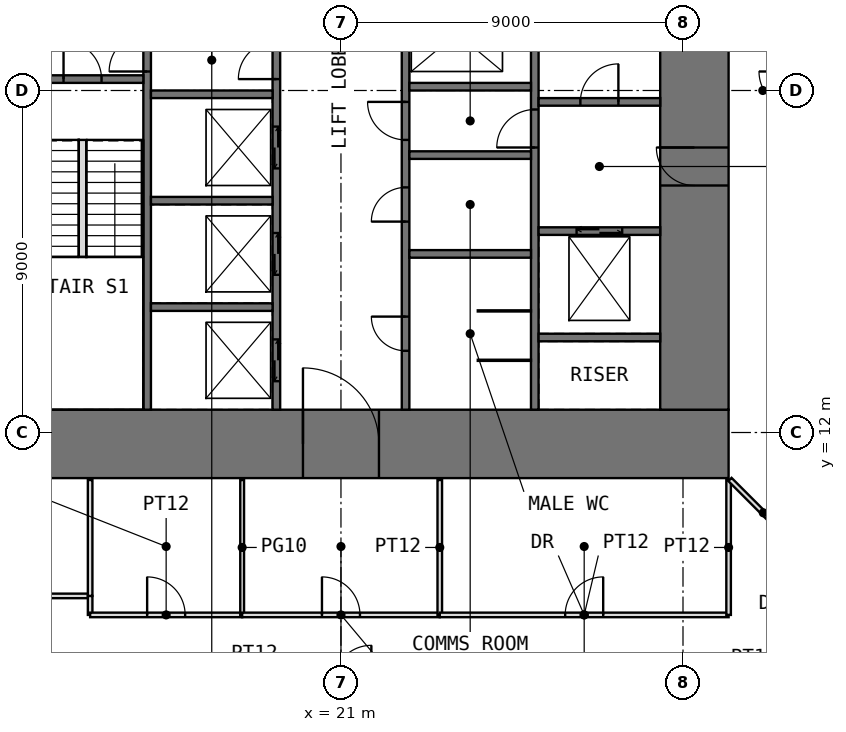
"""IFC4 building model, lengths in metres.
Left out: names, types, materials, properties, quantities, classifications, styles, units other than length and angle.
Written with IfcOpenShell. Run it as: python <this file> out.ifc"""

import sys

from ifc_helpers import new_model, si_unit, direction, frame, frame_2d, origin, place, context, subcontext, project, spatial, rectangle, extrude, element, fill, save


model = new_model("IFC4")
c1 = context("Model", 3, precision=1e-05, world=origin(), true_north=direction((0.0, 1.0)))
c2 = subcontext(c1, "Body", "Model", "MODEL_VIEW")
j1 = project(units=[si_unit("LENGTHUNIT", "METRE"), si_unit("PLANEANGLEUNIT", "RADIAN")], contexts=[c1])
p1 = place(None, origin())
s1 = spatial("IfcSite", under=j1, at=p1, CompositionType="ELEMENT")
p2 = place(p1, origin())
s2 = spatial("IfcBuilding", under=s1, at=p2, CompositionType="ELEMENT")
p3 = place(p2, frame((0.0, 0.0, 30.5)))
s3 = spatial("IfcBuildingStorey", under=s2, at=p3, CompositionType="ELEMENT", Elevation=30.5)
p4 = place(p3, frame((10.8, 11.7, -0.05), z_axis=(0.0, 0.0, 1.0), x_axis=(1.0, 0.0, 0.0)))
e1 = element("IfcWall", 1, at=p4, inside=s3, PredefinedType="SHEAR", context=c2, shape_type="SweptSolid", body=[
    extrude(rectangle(XDim=20.4, YDim=1.8, at=frame_2d((10.2, 0.0))), origin(), (0.0, 0.0, 1.0), 4.0),
])
p5 = place(p4, frame((9.2, 0.0, 0.05)))
e2 = element("IfcOpeningElement", 2, at=p5, cuts=e1, PredefinedType="OPENING", context=c2, shape_type="SweptSolid", body=[
    extrude(rectangle(XDim=2.0, YDim=2.2, at=frame_2d((1.0, 1.1))), frame((0.0, 0.91, 0.0), z_axis=(0.0, -1.0, 0.0), x_axis=(1.0, 0.0, 0.0)), (0.0, 0.0, 1.0), 1.82),
])
p6 = place(p3, frame((30.3, 12.6, -0.05), z_axis=(0.0, 0.0, 1.0), x_axis=(0.0, 1.0, 0.0)))
e3 = element("IfcWall", 3, at=p6, inside=s3, PredefinedType="SHEAR", context=c2, shape_type="SweptSolid", body=[
    extrude(rectangle(XDim=16.8, YDim=1.8, at=frame_2d((8.4, 0.0))), origin(), (0.0, 0.0, 1.0), 4.0),
])
p7 = place(p6, frame((5.9, 0.0, 0.05)))
e4 = element("IfcOpeningElement", 4, at=p7, cuts=e3, PredefinedType="OPENING", context=c2, shape_type="SweptSolid", body=[
    extrude(rectangle(XDim=1.0, YDim=2.2, at=frame_2d((0.5, 1.1))), frame((0.0, 0.91, 0.0), z_axis=(0.0, -1.0, 0.0), x_axis=(1.0, 0.0, 0.0)), (0.0, 0.0, 1.0), 1.82),
])
p8 = place(p3, frame((15.9, 12.6, -0.05), z_axis=(0.0, 0.0, 1.0), x_axis=(0.0, 1.0, 0.0)))
e5 = element("IfcWall", 5, at=p8, inside=s3, PredefinedType="SHEAR", context=c2, shape_type="SweptSolid", body=[
    extrude(rectangle(XDim=16.8, YDim=0.2, at=frame_2d((8.4, 0.0))), origin(), (0.0, 0.0, 1.0), 4.0),
])
p9 = place(p8, frame((8.9, 0.0, 0.05)))
e6 = element("IfcOpeningElement", 6, at=p9, cuts=e5, PredefinedType="OPENING", context=c2, shape_type="SweptSolid", body=[
    extrude(rectangle(XDim=1.0, YDim=2.2, at=frame_2d((0.5, 1.1))), frame((0.0, 0.11, 0.0), z_axis=(0.0, -1.0, 0.0), x_axis=(1.0, 0.0, 0.0)), (0.0, 0.0, 1.0), 0.22),
])
p10 = place(p3, frame((19.3, 12.6, -0.05), z_axis=(0.0, 0.0, 1.0), x_axis=(0.0, 1.0, 0.0)))
e7 = element("IfcWall", 7, at=p10, inside=s3, PredefinedType="SHEAR", context=c2, shape_type="SweptSolid", body=[
    extrude(rectangle(XDim=16.8, YDim=0.2, at=frame_2d((8.4, 0.0))), origin(), (0.0, 0.0, 1.0), 4.0),
])
p11 = place(p10, frame((8.7, 0.0, 0.05)))
e8 = element("IfcOpeningElement", 8, at=p11, cuts=e7, PredefinedType="OPENING", context=c2, shape_type="SweptSolid", body=[
    extrude(rectangle(XDim=1.0, YDim=2.2, at=frame_2d((0.5, 1.1))), frame((0.0, 0.11, 0.0), z_axis=(0.0, -1.0, 0.0), x_axis=(1.0, 0.0, 0.0)), (0.0, 0.0, 1.0), 0.22),
])
p12 = place(p10, frame((10.85, 0.0, 0.05)))
e9 = element("IfcOpeningElement", 9, at=p12, cuts=e7, PredefinedType="OPENING", context=c2, shape_type="SweptSolid", body=[
    extrude(rectangle(XDim=0.9, YDim=2.2, at=frame_2d((0.45, 1.1))), frame((0.0, 0.11, 0.0), z_axis=(0.0, -1.0, 0.0), x_axis=(1.0, 0.0, 0.0)), (0.0, 0.0, 1.0), 0.22),
])
p13 = place(p10, frame((13.3, 0.0, 0.05)))
e10 = element("IfcOpeningElement", 10, at=p13, cuts=e7, PredefinedType="OPENING", context=c2, shape_type="SweptSolid", body=[
    extrude(rectangle(XDim=1.0, YDim=2.2, at=frame_2d((0.5, 1.1))), frame((0.0, 0.11, 0.0), z_axis=(0.0, -1.0, 0.0), x_axis=(1.0, 0.0, 0.0)), (0.0, 0.0, 1.0), 0.22),
])
p14 = place(p10, frame((15.55, 0.0, 0.05)))
e11 = element("IfcOpeningElement", 11, at=p14, cuts=e7, PredefinedType="OPENING", context=c2, shape_type="SweptSolid", body=[
    extrude(rectangle(XDim=0.9, YDim=2.2, at=frame_2d((0.45, 1.1))), frame((0.0, 0.11, 0.0), z_axis=(0.0, -1.0, 0.0), x_axis=(1.0, 0.0, 0.0)), (0.0, 0.0, 1.0), 0.22),
])
p15 = place(p10, frame((0.75, 0.0, 0.05)))
e12 = element("IfcOpeningElement", 12, at=p15, cuts=e7, PredefinedType="OPENING", context=c2, shape_type="SweptSolid", body=[
    extrude(rectangle(XDim=1.1, YDim=2.2, at=frame_2d((0.55, 1.1))), frame((0.0, 0.11, 0.0), z_axis=(0.0, -1.0, 0.0), x_axis=(1.0, 0.0, 0.0)), (0.0, 0.0, 1.0), 0.22),
])
p16 = place(p10, frame((3.55, 0.0, 0.05)))
e13 = element("IfcOpeningElement", 13, at=p16, cuts=e7, PredefinedType="OPENING", context=c2, shape_type="SweptSolid", body=[
    extrude(rectangle(XDim=1.1, YDim=2.2, at=frame_2d((0.55, 1.1))), frame((0.0, 0.11, 0.0), z_axis=(0.0, -1.0, 0.0), x_axis=(1.0, 0.0, 0.0)), (0.0, 0.0, 1.0), 0.22),
])
p17 = place(p10, frame((6.35, 0.0, 0.05)))
e14 = element("IfcOpeningElement", 14, at=p17, cuts=e7, PredefinedType="OPENING", context=c2, shape_type="SweptSolid", body=[
    extrude(rectangle(XDim=1.1, YDim=2.2, at=frame_2d((0.55, 1.1))), frame((0.0, 0.11, 0.0), z_axis=(0.0, -1.0, 0.0), x_axis=(1.0, 0.0, 0.0)), (0.0, 0.0, 1.0), 0.22),
])
p18 = place(p3, frame((22.7, 12.6, -0.05), z_axis=(0.0, 0.0, 1.0), x_axis=(0.0, 1.0, 0.0)))
e15 = element("IfcWall", 15, at=p18, inside=s3, PredefinedType="SHEAR", context=c2, shape_type="SweptSolid", body=[
    extrude(rectangle(XDim=16.8, YDim=0.2, at=frame_2d((8.4, 0.0))), origin(), (0.0, 0.0, 1.0), 4.0),
])
p19 = place(p18, frame((7.1, 0.0, 0.05)))
e16 = element("IfcOpeningElement", 16, at=p19, cuts=e15, PredefinedType="OPENING", context=c2, shape_type="SweptSolid", body=[
    extrude(rectangle(XDim=1.0, YDim=2.2, at=frame_2d((0.5, 1.1))), frame((0.0, 0.11, 0.0), z_axis=(0.0, -1.0, 0.0), x_axis=(1.0, 0.0, 0.0)), (0.0, 0.0, 1.0), 0.22),
])
p20 = place(p18, frame((1.55, 0.0, 0.05)))
e17 = element("IfcOpeningElement", 17, at=p20, cuts=e15, PredefinedType="OPENING", context=c2, shape_type="SweptSolid", body=[
    extrude(rectangle(XDim=0.9, YDim=2.2, at=frame_2d((0.45, 1.1))), frame((0.0, 0.11, 0.0), z_axis=(0.0, -1.0, 0.0), x_axis=(1.0, 0.0, 0.0)), (0.0, 0.0, 1.0), 0.22),
])
p21 = place(p18, frame((4.95, 0.0, 0.05)))
e18 = element("IfcOpeningElement", 18, at=p21, cuts=e15, PredefinedType="OPENING", context=c2, shape_type="SweptSolid", body=[
    extrude(rectangle(XDim=0.9, YDim=2.2, at=frame_2d((0.45, 1.1))), frame((0.0, 0.11, 0.0), z_axis=(0.0, -1.0, 0.0), x_axis=(1.0, 0.0, 0.0)), (0.0, 0.0, 1.0), 0.22),
])
p22 = place(p3, frame((26.1, 12.6, -0.05), z_axis=(0.0, 0.0, 1.0), x_axis=(0.0, 1.0, 0.0)))
e19 = element("IfcWall", 19, at=p22, inside=s3, PredefinedType="SHEAR", context=c2, shape_type="SweptSolid", body=[
    extrude(rectangle(XDim=16.8, YDim=0.2, at=frame_2d((8.4, 0.0))), origin(), (0.0, 0.0, 1.0), 4.0),
])
p23 = place(p22, frame((6.9, 0.0, 0.05)))
e20 = element("IfcOpeningElement", 20, at=p23, cuts=e19, PredefinedType="OPENING", context=c2, shape_type="SweptSolid", body=[
    extrude(rectangle(XDim=1.0, YDim=2.2, at=frame_2d((0.5, 1.1))), frame((0.0, 0.11, 0.0), z_axis=(0.0, -1.0, 0.0), x_axis=(1.0, 0.0, 0.0)), (0.0, 0.0, 1.0), 0.22),
])
p24 = place(p3, frame((12.6, 21.3, -0.05), z_axis=(0.0, 0.0, 1.0), x_axis=(1.0, 0.0, 0.0)))
e21 = element("IfcWall", 21, at=p24, inside=s3, PredefinedType="SHEAR", context=c2, shape_type="SweptSolid", body=[
    extrude(rectangle(XDim=3.2, YDim=0.2, at=frame_2d((1.6, 0.0))), origin(), (0.0, 0.0, 1.0), 4.0),
])
p25 = place(p24, frame((1.1, 0.0, 0.05)))
e22 = element("IfcOpeningElement", 22, at=p25, cuts=e21, PredefinedType="OPENING", context=c2, shape_type="SweptSolid", body=[
    extrude(rectangle(XDim=1.0, YDim=2.2, at=frame_2d((0.5, 1.1))), frame((0.0, 0.11, 0.0), z_axis=(0.0, -1.0, 0.0), x_axis=(1.0, 0.0, 0.0)), (0.0, 0.0, 1.0), 0.22),
])
for number, where, z_axis, x_axis in (
    (23, (16.0, 15.3, -0.05), (0.0, 0.0, 1.0), (1.0, 0.0, 0.0)),
    (24, (16.0, 18.1, -0.05), (0.0, 0.0, 1.0), (1.0, 0.0, 0.0)),
    (25, (16.0, 20.9, -0.05), (0.0, 0.0, 1.0), (1.0, 0.0, 0.0)),
    (26, (22.8, 16.7, -0.05), (0.0, 0.0, 1.0), (1.0, 0.0, 0.0)),
    (27, (22.8, 19.3, -0.05), (0.0, 0.0, 1.0), (1.0, 0.0, 0.0)),
    (28, (22.8, 21.1, -0.05), (0.0, 0.0, 1.0), (1.0, 0.0, 0.0)),
    (29, (26.2, 14.5, -0.05), (0.0, 0.0, 1.0), (1.0, 0.0, 0.0)),
):
    element("IfcWall", number, at=place(p3, frame(where, z_axis=z_axis, x_axis=x_axis)), inside=s3, PredefinedType="SHEAR", context=c2, shape_type="SweptSolid", body=[
        extrude(rectangle(XDim=3.2, YDim=0.2, at=frame_2d((1.6, 0.0))), origin(), (0.0, 0.0, 1.0), 4.0),
    ])
p26 = place(p3, frame((26.2, 17.3, -0.05), z_axis=(0.0, 0.0, 1.0), x_axis=(1.0, 0.0, 0.0)))
e30 = element("IfcWall", 30, at=p26, inside=s3, PredefinedType="SHEAR", context=c2, shape_type="SweptSolid", body=[
    extrude(rectangle(XDim=3.2, YDim=0.2, at=frame_2d((1.6, 0.0))), origin(), (0.0, 0.0, 1.0), 4.0),
])
p27 = place(p26, frame((1.0, 0.0, 0.05)))
e31 = element("IfcOpeningElement", 31, at=p27, cuts=e30, PredefinedType="OPENING", context=c2, shape_type="SweptSolid", body=[
    extrude(rectangle(XDim=1.2, YDim=2.2, at=frame_2d((0.6, 1.1))), frame((0.0, 0.11, 0.0), z_axis=(0.0, -1.0, 0.0), x_axis=(1.0, 0.0, 0.0)), (0.0, 0.0, 1.0), 0.22),
])
p28 = place(p3, frame((26.2, 20.7, -0.05), z_axis=(0.0, 0.0, 1.0), x_axis=(1.0, 0.0, 0.0)))
e32 = element("IfcWall", 32, at=p28, inside=s3, PredefinedType="SHEAR", context=c2, shape_type="SweptSolid", body=[
    extrude(rectangle(XDim=3.2, YDim=0.2, at=frame_2d((1.6, 0.0))), origin(), (0.0, 0.0, 1.0), 4.0),
])
p29 = place(p28, frame((1.1, 0.0, 0.05)))
e33 = element("IfcOpeningElement", 33, at=p29, cuts=e32, PredefinedType="OPENING", context=c2, shape_type="SweptSolid", body=[
    extrude(rectangle(XDim=1.0, YDim=2.2, at=frame_2d((0.5, 1.1))), frame((0.0, 0.11, 0.0), z_axis=(0.0, -1.0, 0.0), x_axis=(1.0, 0.0, 0.0)), (0.0, 0.0, 1.0), 0.22),
])
for number, where, z_axis, x_axis in (
    (34, (24.6, 13.9, 0.0), (0.0, 0.0, 1.0), (1.0, 0.0, 0.0)),
    (35, (24.6, 15.2, 0.0), (0.0, 0.0, 1.0), (1.0, 0.0, 0.0)),
):
    element("IfcWall", number, at=place(p3, frame(where, z_axis=z_axis, x_axis=x_axis)), inside=s3, PredefinedType="PARTITIONING", context=c2, shape_type="SweptSolid", body=[
        extrude(rectangle(XDim=1.4, YDim=0.03, at=frame_2d((0.7, 0.0))), origin(), (0.0, 0.0, 1.0), 3.75),
    ])
p30 = place(p3, frame((10.8, 7.7, 0.0), z_axis=(0.0, 0.0, 1.0), x_axis=(1.0, 0.0, 0.0)))
e36 = element("IfcWall", 36, at=p30, inside=s3, PredefinedType="PARTITIONING", context=c2, shape_type="SweptSolid", body=[
    extrude(rectangle(XDim=3.6, YDim=0.12, at=frame_2d((1.8, 0.0))), origin(), (0.0, 0.0, 1.0), 3.75),
])
p31 = place(p30, frame((1.3, 0.0, 0.0)))
e37 = element("IfcOpeningElement", 37, at=p31, cuts=e36, PredefinedType="OPENING", context=c2, shape_type="SweptSolid", body=[
    extrude(rectangle(XDim=1.0, YDim=2.2, at=frame_2d((0.5, 1.1))), frame((0.0, 0.07, 0.0), z_axis=(0.0, -1.0, 0.0), x_axis=(1.0, 0.0, 0.0)), (0.0, 0.0, 1.0), 0.14),
])
p32 = place(p3, frame((14.4, 7.2, 0.0), z_axis=(0.0, 0.0, 1.0), x_axis=(0.0, 1.0, 0.0)))
e38 = element("IfcWall", 38, at=p32, inside=s3, PredefinedType="PARTITIONING", context=c2, shape_type="SweptSolid", body=[
    extrude(rectangle(XDim=0.5, YDim=0.12, at=frame_2d((0.25, 0.0))), origin(), (0.0, 0.0, 1.0), 3.75),
])
p33 = place(p3, frame((14.4, 7.2, 0.0), z_axis=(0.0, 0.0, 1.0), x_axis=(1.0, 0.0, 0.0)))
e39 = element("IfcWall", 39, at=p33, inside=s3, PredefinedType="PARTITIONING", context=c2, shape_type="SweptSolid", body=[
    extrude(rectangle(XDim=4.0, YDim=0.12, at=frame_2d((2.0, 0.0))), origin(), (0.0, 0.0, 1.0), 3.75),
])
p34 = place(p33, frame((1.5, 0.0, 0.0)))
e40 = element("IfcOpeningElement", 40, at=p34, cuts=e39, PredefinedType="OPENING", context=c2, shape_type="SweptSolid", body=[
    extrude(rectangle(XDim=1.0, YDim=2.4, at=frame_2d((0.5, 1.2))), frame((0.0, 0.07, 0.0), z_axis=(0.0, -1.0, 0.0), x_axis=(1.0, 0.0, 0.0)), (0.0, 0.0, 1.0), 0.14),
])
p35 = place(p3, frame((14.4, 7.7, 0.0), z_axis=(0.0, 0.0, 1.0), x_axis=(0.0, 1.0, 0.0)))
e41 = element("IfcWall", 41, at=p35, inside=s3, PredefinedType="PARTITIONING", context=c2, shape_type="SweptSolid", body=[
    extrude(rectangle(XDim=3.05, YDim=0.12, at=frame_2d((1.525, 0.0))), origin(), (0.0, 0.0, 1.0), 3.75),
])
p36 = place(p3, frame((18.4, 7.2, 0.0), z_axis=(0.0, 0.0, 1.0), x_axis=(0.0, 1.0, 0.0)))
e42 = element("IfcWall", 42, at=p36, inside=s3, PredefinedType="PARTITIONING", context=c2, shape_type="SweptSolid", body=[
    extrude(rectangle(XDim=3.55, YDim=0.1, at=frame_2d((1.775, 0.0))), origin(), (0.0, 0.0, 1.0), 3.75),
])
p37 = place(p3, frame((18.4, 7.2, 0.0), z_axis=(0.0, 0.0, 1.0), x_axis=(1.0, 0.0, 0.0)))
e43 = element("IfcWall", 43, at=p37, inside=s3, PredefinedType="PARTITIONING", context=c2, shape_type="SweptSolid", body=[
    extrude(rectangle(XDim=5.2, YDim=0.12, at=frame_2d((2.6, 0.0))), origin(), (0.0, 0.0, 1.0), 3.75),
])
p38 = place(p37, frame((2.1, 0.0, 0.0)))
e44 = element("IfcOpeningElement", 44, at=p38, cuts=e43, PredefinedType="OPENING", context=c2, shape_type="SweptSolid", body=[
    extrude(rectangle(XDim=1.0, YDim=2.4, at=frame_2d((0.5, 1.2))), frame((0.0, 0.07, 0.0), z_axis=(0.0, -1.0, 0.0), x_axis=(1.0, 0.0, 0.0)), (0.0, 0.0, 1.0), 0.14),
])
p39 = place(p3, frame((23.6, 7.2, 0.0), z_axis=(0.0, 0.0, 1.0), x_axis=(0.0, 1.0, 0.0)))
e45 = element("IfcWall", 45, at=p39, inside=s3, PredefinedType="PARTITIONING", context=c2, shape_type="SweptSolid", body=[
    extrude(rectangle(XDim=3.55, YDim=0.12, at=frame_2d((1.775, 0.0))), origin(), (0.0, 0.0, 1.0), 3.75),
])
p40 = place(p3, frame((23.6, 7.2, 0.0), z_axis=(0.0, 0.0, 1.0), x_axis=(1.0, 0.0, 0.0)))
e46 = element("IfcWall", 46, at=p40, inside=s3, PredefinedType="PARTITIONING", context=c2, shape_type="SweptSolid", body=[
    extrude(rectangle(XDim=7.6, YDim=0.12, at=frame_2d((3.8, 0.0))), origin(), (0.0, 0.0, 1.0), 3.75),
])
p41 = place(p40, frame((3.3, 0.0, 0.0)))
e47 = element("IfcOpeningElement", 47, at=p41, cuts=e46, PredefinedType="OPENING", context=c2, shape_type="SweptSolid", body=[
    extrude(rectangle(XDim=1.0, YDim=2.2, at=frame_2d((0.5, 1.1))), frame((0.0, 0.07, 0.0), z_axis=(0.0, -1.0, 0.0), x_axis=(1.0, 0.0, 0.0)), (0.0, 0.0, 1.0), 0.14),
])
p42 = place(p3, frame((31.2, 7.2, 0.0), z_axis=(0.0, 0.0, 1.0), x_axis=(0.0, 1.0, 0.0)))
e48 = element("IfcWall", 48, at=p42, inside=s3, PredefinedType="PARTITIONING", context=c2, shape_type="SweptSolid", body=[
    extrude(rectangle(XDim=3.55, YDim=0.12, at=frame_2d((1.775, 0.0))), origin(), (0.0, 0.0, 1.0), 3.75),
])
p43 = place(p3, frame((31.235, 10.765, 0.0), z_axis=(0.0, 0.0, 1.0), x_axis=(0.707106781187, -0.707106781187, 0.0)))
e49 = element("IfcWall", 49, at=p43, inside=s3, PredefinedType="PARTITIONING", context=c2, shape_type="SweptSolid", body=[
    extrude(rectangle(XDim=2.481, YDim=0.12, at=frame_2d((1.241, 0.0))), origin(), (0.0, 0.0, 1.0), 3.75),
])
p44 = place(p3, frame((14.2, 16.62, 0.0), z_axis=(0.0, 0.0, 1.0), x_axis=(0.0, 1.0, 0.0)))
e50 = element("IfcWall", 50, at=p44, inside=s3, PredefinedType="PARTITIONING", context=c2, shape_type="SweptSolid", body=[
    extrude(rectangle(XDim=3.08, YDim=0.2, at=frame_2d((1.54, 0.0))), origin(), (0.0, 0.0, 1.0), 4.0),
])
p45 = place(p5, origin())
e51 = element("IfcDoor", 51, at=p45, inside=s3, OperationType="DOUBLE_DOOR_SINGLE_SWING", PredefinedType="DOOR", context=c2, shape_type="SweptSolid", body=[
    extrude(rectangle(XDim=2.0, YDim=2.2, at=frame_2d((1.0, 1.1))), frame((0.0, 0.025, 0.0), z_axis=(0.0, -1.0, 0.0), x_axis=(1.0, 0.0, 0.0)), (0.0, 0.0, 1.0), 0.05),
])
fill(e2, e51)
p46 = place(p7, origin())
e52 = element("IfcDoor", 52, at=p46, inside=s3, OperationType="SINGLE_SWING_RIGHT", PredefinedType="DOOR", context=c2, shape_type="SweptSolid", body=[
    extrude(rectangle(XDim=1.0, YDim=2.2, at=frame_2d((0.5, 1.1))), frame((0.0, 0.025, 0.0), z_axis=(0.0, -1.0, 0.0), x_axis=(1.0, 0.0, 0.0)), (0.0, 0.0, 1.0), 0.05),
])
fill(e4, e52)
p47 = place(p25, origin())
e53 = element("IfcDoor", 53, at=p47, inside=s3, OperationType="SINGLE_SWING_LEFT", PredefinedType="DOOR", context=c2, shape_type="SweptSolid", body=[
    extrude(rectangle(XDim=1.0, YDim=2.2, at=frame_2d((0.5, 1.1))), frame((0.0, 0.025, 0.0), z_axis=(0.0, -1.0, 0.0), x_axis=(1.0, 0.0, 0.0)), (0.0, 0.0, 1.0), 0.05),
])
fill(e22, e53)
p48 = place(p29, origin())
e54 = element("IfcDoor", 54, at=p48, inside=s3, OperationType="SINGLE_SWING_RIGHT", PredefinedType="DOOR", context=c2, shape_type="SweptSolid", body=[
    extrude(rectangle(XDim=1.0, YDim=2.2, at=frame_2d((0.5, 1.1))), frame((0.0, 0.025, 0.0), z_axis=(0.0, -1.0, 0.0), x_axis=(1.0, 0.0, 0.0)), (0.0, 0.0, 1.0), 0.05),
])
fill(e33, e54)
p49 = place(p9, origin())
e55 = element("IfcDoor", 55, at=p49, inside=s3, OperationType="SINGLE_SWING_LEFT", PredefinedType="DOOR", context=c2, shape_type="SweptSolid", body=[
    extrude(rectangle(XDim=1.0, YDim=2.2, at=frame_2d((0.5, 1.1))), frame((0.0, 0.025, 0.0), z_axis=(0.0, -1.0, 0.0), x_axis=(1.0, 0.0, 0.0)), (0.0, 0.0, 1.0), 0.05),
])
fill(e6, e55)
p50 = place(p23, origin())
e56 = element("IfcDoor", 56, at=p50, inside=s3, OperationType="SINGLE_SWING_LEFT", PredefinedType="DOOR", context=c2, shape_type="SweptSolid", body=[
    extrude(rectangle(XDim=1.0, YDim=2.2, at=frame_2d((0.5, 1.1))), frame((0.0, 0.025, 0.0), z_axis=(0.0, -1.0, 0.0), x_axis=(1.0, 0.0, 0.0)), (0.0, 0.0, 1.0), 0.05),
])
fill(e20, e56)
p51 = place(p11, origin())
e57 = element("IfcDoor", 57, at=p51, inside=s3, OperationType="SINGLE_SWING_LEFT", PredefinedType="DOOR", context=c2, shape_type="SweptSolid", body=[
    extrude(rectangle(XDim=1.0, YDim=2.2, at=frame_2d((0.5, 1.1))), frame((0.0, 0.025, 0.0), z_axis=(0.0, -1.0, 0.0), x_axis=(1.0, 0.0, 0.0)), (0.0, 0.0, 1.0), 0.05),
])
fill(e8, e57)
p52 = place(p19, origin())
e58 = element("IfcDoor", 58, at=p52, inside=s3, OperationType="SINGLE_SWING_RIGHT", PredefinedType="DOOR", context=c2, shape_type="SweptSolid", body=[
    extrude(rectangle(XDim=1.0, YDim=2.2, at=frame_2d((0.5, 1.1))), frame((0.0, 0.025, 0.0), z_axis=(0.0, -1.0, 0.0), x_axis=(1.0, 0.0, 0.0)), (0.0, 0.0, 1.0), 0.05),
])
fill(e16, e58)
p53 = place(p20, origin())
e59 = element("IfcDoor", 59, at=p53, inside=s3, OperationType="SINGLE_SWING_RIGHT", PredefinedType="DOOR", context=c2, shape_type="SweptSolid", body=[
    extrude(rectangle(XDim=0.9, YDim=2.2, at=frame_2d((0.45, 1.1))), frame((0.0, 0.025, 0.0), z_axis=(0.0, -1.0, 0.0), x_axis=(1.0, 0.0, 0.0)), (0.0, 0.0, 1.0), 0.05),
])
fill(e17, e59)
p54 = place(p21, origin())
e60 = element("IfcDoor", 60, at=p54, inside=s3, OperationType="SINGLE_SWING_LEFT", PredefinedType="DOOR", context=c2, shape_type="SweptSolid", body=[
    extrude(rectangle(XDim=0.9, YDim=2.2, at=frame_2d((0.45, 1.1))), frame((0.0, 0.025, 0.0), z_axis=(0.0, -1.0, 0.0), x_axis=(1.0, 0.0, 0.0)), (0.0, 0.0, 1.0), 0.05),
])
fill(e18, e60)
p55 = place(p34, origin())
e61 = element("IfcDoor", 61, at=p55, inside=s3, OperationType="SINGLE_SWING_LEFT", PredefinedType="DOOR", context=c2, shape_type="SweptSolid", body=[
    extrude(rectangle(XDim=1.0, YDim=2.4, at=frame_2d((0.5, 1.2))), frame((0.0, 0.025, 0.0), z_axis=(0.0, -1.0, 0.0), x_axis=(1.0, 0.0, 0.0)), (0.0, 0.0, 1.0), 0.05),
])
fill(e40, e61)
p56 = place(p41, origin())
e62 = element("IfcDoor", 62, at=p56, inside=s3, OperationType="SINGLE_SWING_RIGHT", PredefinedType="DOOR", context=c2, shape_type="SweptSolid", body=[
    extrude(rectangle(XDim=1.0, YDim=2.2, at=frame_2d((0.5, 1.1))), frame((0.0, 0.025, 0.0), z_axis=(0.0, -1.0, 0.0), x_axis=(1.0, 0.0, 0.0)), (0.0, 0.0, 1.0), 0.05),
])
fill(e47, e62)
p57 = place(p38, origin())
e63 = element("IfcDoor", 63, at=p57, inside=s3, OperationType="SINGLE_SWING_LEFT", PredefinedType="DOOR", context=c2, shape_type="SweptSolid", body=[
    extrude(rectangle(XDim=1.0, YDim=2.4, at=frame_2d((0.5, 1.2))), frame((0.0, 0.025, 0.0), z_axis=(0.0, -1.0, 0.0), x_axis=(1.0, 0.0, 0.0)), (0.0, 0.0, 1.0), 0.05),
])
fill(e44, e63)
p58 = place(p15, origin())
e64 = element("IfcDoor", 64, at=p58, inside=s3, OperationType="DOUBLE_DOOR_SLIDING", PredefinedType="DOOR", context=c2, shape_type="SweptSolid", body=[
    extrude(rectangle(XDim=1.1, YDim=2.2, at=frame_2d((0.55, 1.1))), frame((0.0, 0.025, 0.0), z_axis=(0.0, -1.0, 0.0), x_axis=(1.0, 0.0, 0.0)), (0.0, 0.0, 1.0), 0.05),
])
fill(e12, e64)
p59 = place(p16, origin())
e65 = element("IfcDoor", 65, at=p59, inside=s3, OperationType="DOUBLE_DOOR_SLIDING", PredefinedType="DOOR", context=c2, shape_type="SweptSolid", body=[
    extrude(rectangle(XDim=1.1, YDim=2.2, at=frame_2d((0.55, 1.1))), frame((0.0, 0.025, 0.0), z_axis=(0.0, -1.0, 0.0), x_axis=(1.0, 0.0, 0.0)), (0.0, 0.0, 1.0), 0.05),
])
fill(e13, e65)
p60 = place(p17, origin())
e66 = element("IfcDoor", 66, at=p60, inside=s3, OperationType="DOUBLE_DOOR_SLIDING", PredefinedType="DOOR", context=c2, shape_type="SweptSolid", body=[
    extrude(rectangle(XDim=1.1, YDim=2.2, at=frame_2d((0.55, 1.1))), frame((0.0, 0.025, 0.0), z_axis=(0.0, -1.0, 0.0), x_axis=(1.0, 0.0, 0.0)), (0.0, 0.0, 1.0), 0.05),
])
fill(e14, e66)
p61 = place(p27, origin())
e67 = element("IfcDoor", 67, at=p61, inside=s3, OperationType="DOUBLE_DOOR_SLIDING", PredefinedType="DOOR", context=c2, shape_type="SweptSolid", body=[
    extrude(rectangle(XDim=1.2, YDim=2.2, at=frame_2d((0.6, 1.1))), frame((0.0, 0.025, 0.0), z_axis=(0.0, -1.0, 0.0), x_axis=(1.0, 0.0, 0.0)), (0.0, 0.0, 1.0), 0.05),
])
fill(e31, e67)
save(model, sys.argv[1])
